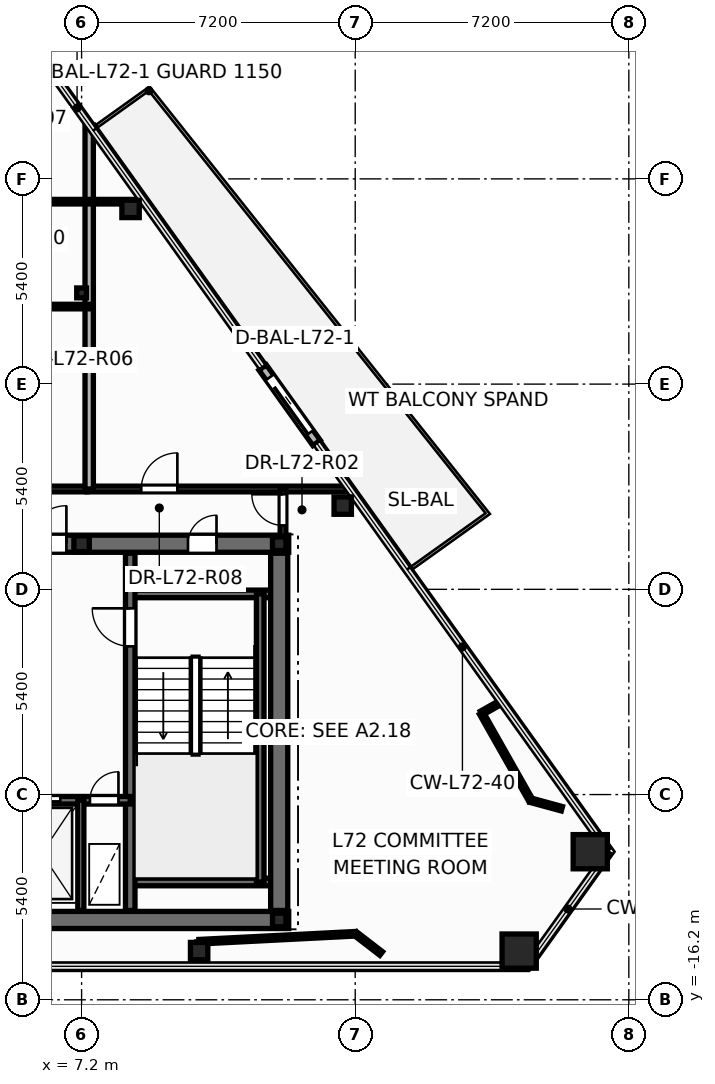
"""IFC4 building model, lengths in metres.
Left out: names, types, materials, properties, quantities, classifications, styles, units other than length and angle.
Written with IfcOpenShell. Run it as: python <this file> out.ifc"""

import sys

from ifc_helpers import new_model, si_unit, direction, frame, frame_2d, origin, origin_2d, place, context, subcontext, project, spatial, rectangle, hollow_rectangle, hollow_circle, i_section, extrude, element, fill, save


model = new_model("IFC4")
c1 = context("Model", 3, precision=1e-05, world=origin(), true_north=direction((0.0, 1.0)))
c2 = subcontext(c1, "Body", "Model", "MODEL_VIEW")
j1 = project(units=[si_unit("LENGTHUNIT", "METRE"), si_unit("PLANEANGLEUNIT", "RADIAN")], contexts=[c1])
p1 = place(None, origin())
s1 = spatial("IfcSite", under=j1, at=p1, CompositionType="ELEMENT")
p2 = place(p1, origin())
s2 = spatial("IfcBuilding", under=s1, at=p2, CompositionType="ELEMENT")
p3 = place(p2, frame((0.0, 0.0, 274.2)))
s3 = spatial("IfcBuildingStorey", under=s2, at=p3, CompositionType="ELEMENT", Elevation=274.2)
for number, where, z_axis, x_axis in (
    (1, (18.714, -14.919, 0.0), (0.0, 0.0, 1.0), (1.0, 0.0, 0.0)),
    (2, (20.585, -12.303, 0.0), (0.0, 0.0, 1.0), (1.0, 0.0, 0.0)),
):
    element("IfcColumn", number, at=place(p3, frame(where, z_axis=z_axis, x_axis=x_axis)), inside=s3, PredefinedType="COLUMN", context=c2, shape_type="SweptSolid", body=[
        extrude(hollow_rectangle(XDim=0.9, YDim=0.9, WallThickness=0.04, at=origin_2d()), origin(), (0.0, 0.0, 1.0), 3.6),
    ])
for number, where, z_axis, x_axis in (
    (3, (10.293, -14.919, 0.0), (0.0, 0.0, 1.0), (1.0, 0.0, 0.0)),
    (4, (14.072, -3.196, 0.0), (0.0, 0.0, 1.0), (1.0, 0.0, 0.0)),
    (5, (8.489, 4.61, 0.0), (0.0, 0.0, 1.0), (1.0, 0.0, 0.0)),
):
    element("IfcColumn", number, at=place(p3, frame(where, z_axis=z_axis, x_axis=x_axis)), inside=s3, PredefinedType="COLUMN", context=c2, shape_type="SweptSolid", body=[
        extrude(hollow_circle(Radius=0.229, WallThickness=0.016, at=origin_2d()), origin(), (0.0, 0.0, 1.0), 3.6),
    ])
for number, where, z_axis, x_axis in (
    (6, (12.4, -14.1, 0.0), (0.0, 0.0, 1.0), (1.0, 0.0, 0.0)),
    (7, (12.4, -4.2, 0.0), (0.0, 0.0, 1.0), (1.0, 0.0, 0.0)),
):
    element("IfcColumn", number, at=place(p3, frame(where, z_axis=z_axis, x_axis=x_axis)), inside=s3, PredefinedType="COLUMN", context=c2, shape_type="SweptSolid", body=[
        extrude(i_section(OverallWidth=0.352, OverallDepth=0.359, WebThickness=0.018, FlangeThickness=0.026, at=origin_2d()), origin(), (0.0, 0.0, 1.0), 3.6),
    ])
p4 = place(p3, frame((7.2, -4.2, 0.0), z_axis=(0.0, 0.0, 1.0), x_axis=(1.0, 0.0, 0.0)))
e8 = element("IfcColumn", 8, at=p4, inside=s3, PredefinedType="PILASTER", context=c2, shape_type="SweptSolid", body=[
    extrude(i_section(OverallWidth=0.405, OverallDepth=0.414, WebThickness=0.022, FlangeThickness=0.032, at=origin_2d()), origin(), (0.0, 0.0, 1.0), 3.6),
])
p5 = place(p3, frame((7.2, 2.4, 0.0), z_axis=(0.0, 0.0, 1.0), x_axis=(1.0, 0.0, 0.0)))
e9 = element("IfcColumn", 9, at=p5, inside=s3, PredefinedType="COLUMN", context=c2, shape_type="SweptSolid", body=[
    extrude(i_section(OverallWidth=0.256, OverallDepth=0.26, WebThickness=0.01, FlangeThickness=0.017, at=origin_2d()), origin(), (0.0, 0.0, 1.0), 3.6),
])
p6 = place(p3, frame((13.383, -1.547, -0.015), z_axis=(0.0, 0.0, 1.0), x_axis=(-0.58167352525, 0.813422344187, 0.0)))
e10 = element("IfcWall", 10, at=p6, inside=s3, PredefinedType="STANDARD", context=c2, shape_type="SweptSolid", body=[
    extrude(rectangle(XDim=2.44, YDim=0.24, at=frame_2d((1.22, 0.0))), origin(), (0.0, 0.0, 1.0), 2.878),
])
p7 = place(p6, frame((0.32, 0.0, 0.015)))
e11 = element("IfcOpeningElement", 11, at=p7, cuts=e10, PredefinedType="OPENING", context=c2, shape_type="SweptSolid", body=[
    extrude(rectangle(XDim=1.806, YDim=2.204, at=frame_2d((0.9, 1.102))), frame((0.0, 0.13, 0.0), z_axis=(0.0, -1.0, 0.0), x_axis=(1.0, 0.0, 0.0)), (0.0, 0.0, 1.0), 0.26),
])
p8 = place(p3, frame((-12.65, -14.1, 0.0), z_axis=(0.0, 0.0, 1.0), x_axis=(1.0, 0.0, 0.0)))
e12 = element("IfcWall", 12, at=p8, inside=s3, PredefinedType="SHEAR", context=c2, shape_type="SweptSolid", body=[
    extrude(rectangle(XDim=25.3, YDim=0.45, at=frame_2d((12.65, 0.0))), origin(), (0.0, 0.0, 1.0), 3.6),
])
p9 = place(p3, frame((-12.65, -4.2, 0.0), z_axis=(0.0, 0.0, 1.0), x_axis=(1.0, 0.0, 0.0)))
e13 = element("IfcWall", 13, at=p9, inside=s3, PredefinedType="SHEAR", context=c2, shape_type="SweptSolid", body=[
    extrude(rectangle(XDim=25.3, YDim=0.45, at=frame_2d((12.65, 0.0))), origin(), (0.0, 0.0, 1.0), 3.6),
])
p10 = place(p9, frame((1.85, 0.0, 0.0)))
e14 = element("IfcOpeningElement", 14, at=p10, cuts=e13, PredefinedType="OPENING", context=c2, shape_type="SweptSolid", body=[
    extrude(rectangle(XDim=0.756, YDim=2.054, at=frame_2d((0.375, 1.027))), frame((0.0, 0.235, 0.0), z_axis=(0.0, -1.0, 0.0), x_axis=(1.0, 0.0, 0.0)), (0.0, 0.0, 1.0), 0.47),
])
p11 = place(p9, frame((22.65, 0.0, 0.0)))
e15 = element("IfcOpeningElement", 15, at=p11, cuts=e13, PredefinedType="OPENING", context=c2, shape_type="SweptSolid", body=[
    extrude(rectangle(XDim=0.756, YDim=2.054, at=frame_2d((0.375, 1.027))), frame((0.0, 0.235, 0.0), z_axis=(0.0, -1.0, 0.0), x_axis=(1.0, 0.0, 0.0)), (0.0, 0.0, 1.0), 0.47),
])
p12 = place(p9, frame((5.85, 0.0, 0.0)))
e16 = element("IfcOpeningElement", 16, at=p12, cuts=e13, PredefinedType="OPENING", context=c2, shape_type="SweptSolid", body=[
    extrude(rectangle(XDim=1.006, YDim=2.104, at=frame_2d((0.5, 1.052))), frame((0.0, 0.235, 0.0), z_axis=(0.0, -1.0, 0.0), x_axis=(1.0, 0.0, 0.0)), (0.0, 0.0, 1.0), 0.47),
])
p13 = place(p9, frame((10.35, 0.0, 0.0)))
e17 = element("IfcOpeningElement", 17, at=p13, cuts=e13, PredefinedType="OPENING", context=c2, shape_type="SweptSolid", body=[
    extrude(rectangle(XDim=1.406, YDim=2.154, at=frame_2d((0.7, 1.077))), frame((0.0, 0.235, 0.0), z_axis=(0.0, -1.0, 0.0), x_axis=(1.0, 0.0, 0.0)), (0.0, 0.0, 1.0), 0.47),
])
p14 = place(p9, frame((18.45, 0.0, 0.0)))
e18 = element("IfcOpeningElement", 18, at=p14, cuts=e13, PredefinedType="OPENING", context=c2, shape_type="SweptSolid", body=[
    extrude(rectangle(XDim=1.006, YDim=2.104, at=frame_2d((0.5, 1.052))), frame((0.0, 0.235, 0.0), z_axis=(0.0, -1.0, 0.0), x_axis=(1.0, 0.0, 0.0)), (0.0, 0.0, 1.0), 0.47),
])
for number, where, z_axis, x_axis in (
    (19, (8.48, -5.52, 0.0), (0.0, 0.0, 1.0), (1.0, 0.0, 0.0)),
    (20, (8.48, -13.1, 0.0), (0.0, 0.0, 1.0), (1.0, 0.0, 0.0)),
):
    element("IfcWall", number, at=place(p3, frame(where, z_axis=z_axis, x_axis=x_axis)), inside=s3, PredefinedType="SOLIDWALL", context=c2, shape_type="SweptSolid", body=[
        extrude(rectangle(XDim=3.87, YDim=0.2, at=frame_2d((1.935, 0.0))), origin(), (0.0, 0.0, 1.0), 3.6),
    ])
p15 = place(p3, frame((11.9, -13.1, 0.0), z_axis=(0.0, 0.0, 1.0), x_axis=(0.0, 1.0, 0.0)))
e21 = element("IfcWall", 21, at=p15, inside=s3, PredefinedType="SOLIDWALL", context=c2, shape_type="SweptSolid", body=[
    extrude(rectangle(XDim=7.58, YDim=0.2, at=frame_2d((3.79, 0.0))), origin(), (0.0, 0.0, 1.0), 3.6),
])
p16 = place(p3, frame((8.48, -13.85, 0.0), z_axis=(0.0, 0.0, 1.0), x_axis=(0.0, 1.0, 0.0)))
e22 = element("IfcWall", 22, at=p16, inside=s3, PredefinedType="SHEAR", context=c2, shape_type="SweptSolid", body=[
    extrude(rectangle(XDim=9.4, YDim=0.25, at=frame_2d((4.7, 0.0))), origin(), (0.0, 0.0, 1.0), 3.6),
])
p17 = place(p16, frame((6.95, 0.0, 0.0)))
e23 = element("IfcOpeningElement", 23, at=p17, cuts=e22, PredefinedType="OPENING", context=c2, shape_type="SweptSolid", body=[
    extrude(rectangle(XDim=1.006, YDim=2.104, at=frame_2d((0.5, 1.052))), frame((0.0, 0.135, 0.0), z_axis=(0.0, -1.0, 0.0), x_axis=(1.0, 0.0, 0.0)), (0.0, 0.0, 1.0), 0.27),
])
p18 = place(p3, frame((5.12, -10.95, 0.0), z_axis=(0.0, 0.0, 1.0), x_axis=(1.0, 0.0, 0.0)))
e24 = element("IfcWall", 24, at=p18, inside=s3, PredefinedType="SOLIDWALL", context=c2, shape_type="SweptSolid", body=[
    extrude(rectangle(XDim=3.36, YDim=0.2, at=frame_2d((1.68, 0.0))), origin(), (0.0, 0.0, 1.0), 3.6),
])
p19 = place(p18, frame((0.42, 0.0, 0.0)))
e25 = element("IfcOpeningElement", 25, at=p19, cuts=e24, PredefinedType="OPENING", context=c2, shape_type="SweptSolid", body=[
    extrude(rectangle(XDim=1.106, YDim=2.104, at=frame_2d((0.55, 1.052))), frame((0.0, 0.11, 0.0), z_axis=(0.0, -1.0, 0.0), x_axis=(1.0, 0.0, 0.0)), (0.0, 0.0, 1.0), 0.22),
])
p20 = place(p18, frame((2.3, 0.0, 0.0)))
e26 = element("IfcOpeningElement", 26, at=p20, cuts=e24, PredefinedType="OPENING", context=c2, shape_type="SweptSolid", body=[
    extrude(rectangle(XDim=0.756, YDim=2.054, at=frame_2d((0.375, 1.027))), frame((0.0, 0.11, 0.0), z_axis=(0.0, -1.0, 0.0), x_axis=(1.0, 0.0, 0.0)), (0.0, 0.0, 1.0), 0.22),
])
p21 = place(p3, frame((7.18, -13.85, 0.0), z_axis=(0.0, 0.0, 1.0), x_axis=(0.0, 1.0, 0.0)))
e27 = element("IfcWall", 27, at=p21, inside=s3, PredefinedType="PARTITIONING", context=c2, shape_type="SweptSolid", body=[
    extrude(rectangle(XDim=2.9, YDim=0.16, at=frame_2d((1.45, 0.0))), origin(), (0.0, 0.0, 1.0), 2.57),
])
p22 = place(p3, frame((12.4, -13.85, 0.0), z_axis=(0.0, 0.0, 1.0), x_axis=(0.0, 1.0, 0.0)))
e28 = element("IfcWall", 28, at=p22, inside=s3, PredefinedType="SHEAR", context=c2, shape_type="SweptSolid", body=[
    extrude(rectangle(XDim=9.4, YDim=0.45, at=frame_2d((4.7, 0.0))), origin(), (0.0, 0.0, 1.0), 3.6),
])
p23 = place(p3, frame((7.34, -2.76, 0.0), z_axis=(0.0, 0.0, 1.0), x_axis=(1.0, 0.0, 0.0)))
e29 = element("IfcWall", 29, at=p23, inside=s3, PredefinedType="PARTITIONING", context=c2, shape_type="SweptSolid", body=[
    extrude(rectangle(XDim=6.911, YDim=0.15, at=frame_2d((3.456, 0.0))), origin(), (0.0, 0.0, 1.0), 2.32),
])
p24 = place(p23, frame((1.43, 0.0, 0.0)))
e30 = element("IfcOpeningElement", 30, at=p24, cuts=e29, PredefinedType="OPENING", context=c2, shape_type="SweptSolid", body=[
    extrude(rectangle(XDim=0.956, YDim=2.104, at=frame_2d((0.475, 1.052))), frame((0.0, 0.085, 0.0), z_axis=(0.0, -1.0, 0.0), x_axis=(1.0, 0.0, 0.0)), (0.0, 0.0, 1.0), 0.17),
])
p25 = place(p3, frame((2.36, -2.76, 0.0), z_axis=(0.0, 0.0, 1.0), x_axis=(1.0, 0.0, 0.0)))
e31 = element("IfcWall", 31, at=p25, inside=s3, PredefinedType="PARTITIONING", context=c2, shape_type="SweptSolid", body=[
    extrude(rectangle(XDim=4.978, YDim=0.15, at=frame_2d((2.489, 0.0))), origin(), (0.0, 0.0, 1.0), 2.32),
])
p26 = place(p25, frame((0.359, 0.0, 0.0)))
e32 = element("IfcOpeningElement", 32, at=p26, cuts=e31, PredefinedType="OPENING", context=c2, shape_type="SweptSolid", body=[
    extrude(rectangle(XDim=0.956, YDim=2.104, at=frame_2d((0.475, 1.052))), frame((0.0, 0.085, 0.0), z_axis=(0.0, -1.0, 0.0), x_axis=(1.0, 0.0, 0.0)), (0.0, 0.0, 1.0), 0.17),
])
p27 = place(p3, frame((7.4, -2.76, 0.0), z_axis=(0.0, 0.0, 1.0), x_axis=(0.0, 1.0, 0.0)))
e33 = element("IfcWall", 33, at=p27, inside=s3, PredefinedType="PARTITIONING", context=c2, shape_type="SweptSolid", body=[
    extrude(rectangle(XDim=9.579, YDim=0.22, at=frame_2d((4.79, 0.0))), origin(), (0.0, 0.0, 1.0), 2.32),
])
p28 = place(p3, frame((4.4, 4.8, 0.0), z_axis=(0.0, 0.0, 1.0), x_axis=(1.0, 0.0, 0.0)))
e34 = element("IfcWall", 34, at=p28, inside=s3, PredefinedType="PARTITIONING", context=c2, shape_type="SweptSolid", body=[
    extrude(rectangle(XDim=4.444, YDim=0.12, at=frame_2d((2.222, 0.0))), origin(), (0.0, 0.0, 1.0), 2.32),
])
p29 = place(p28, frame((0.4, 0.0, 0.0)))
e35 = element("IfcOpeningElement", 35, at=p29, cuts=e34, PredefinedType="OPENING", context=c2, shape_type="SweptSolid", body=[
    extrude(rectangle(XDim=0.926, YDim=2.104, at=frame_2d((0.46, 1.052))), frame((0.0, 0.07, 0.0), z_axis=(0.0, -1.0, 0.0), x_axis=(1.0, 0.0, 0.0)), (0.0, 0.0, 1.0), 0.14),
])
p30 = place(p3, frame((3.68, 2.04, 0.0), z_axis=(0.0, 0.0, 1.0), x_axis=(1.0, 0.0, 0.0)))
e36 = element("IfcWall", 36, at=p30, inside=s3, PredefinedType="PARTITIONING", context=c2, shape_type="SweptSolid", body=[
    extrude(rectangle(XDim=3.72, YDim=0.12, at=frame_2d((1.86, 0.0))), origin(), (0.0, 0.0, 1.0), 2.32),
])
p31 = place(p30, frame((0.435, 0.0, 0.0)))
e37 = element("IfcOpeningElement", 37, at=p31, cuts=e36, PredefinedType="OPENING", context=c2, shape_type="SweptSolid", body=[
    extrude(rectangle(XDim=0.926, YDim=2.104, at=frame_2d((0.46, 1.052))), frame((0.0, 0.07, 0.0), z_axis=(0.0, -1.0, 0.0), x_axis=(1.0, 0.0, 0.0)), (0.0, 0.0, 1.0), 0.14),
])
p32 = place(p3, frame((10.29, -14.672, 0.0), z_axis=(0.0, 0.0, 1.0), x_axis=(0.998709464059, 0.050787856814, 0.0)))
e38 = element("IfcWall", 38, at=p32, inside=s3, PredefinedType="PARTITIONING", context=c2, shape_type="SweptSolid", body=[
    extrude(rectangle(XDim=4.125, YDim=0.12, at=frame_2d((2.062, 0.0))), origin(), (0.0, 0.0, 1.0), 2.32),
])
p33 = place(p3, frame((19.019, -10.95, 0.0), z_axis=(0.0, 0.0, 1.0), x_axis=(-0.492860512567, 0.870108335297, 0.0)))
e39 = element("IfcWall", 39, at=p33, inside=s3, PredefinedType="PARTITIONING", context=c2, shape_type="SweptSolid", body=[
    extrude(rectangle(XDim=2.633, YDim=0.12, at=frame_2d((1.317, 0.0))), origin(), (0.0, 0.0, 1.0), 2.32),
])
p34 = place(p3, frame((12.5, -4.24, 0.0), z_axis=(0.0, 0.0, 1.0), x_axis=(0.0, 1.0, 0.0)))
e40 = element("IfcWall", 40, at=p34, inside=s3, PredefinedType="PARTITIONING", context=c2, shape_type="SweptSolid", body=[
    extrude(rectangle(XDim=1.48, YDim=0.15, at=frame_2d((0.74, 0.0))), origin(), (0.0, 0.0, 1.0), 2.32),
])
p35 = place(p34, frame((0.522, 0.0, 0.0)))
e41 = element("IfcOpeningElement", 41, at=p35, cuts=e40, PredefinedType="OPENING", context=c2, shape_type="SweptSolid", body=[
    extrude(rectangle(XDim=0.826, YDim=2.104, at=frame_2d((0.41, 1.052))), frame((0.0, 0.085, 0.0), z_axis=(0.0, -1.0, 0.0), x_axis=(1.0, 0.0, 0.0)), (0.0, 0.0, 1.0), 0.17),
])
p36 = place(p3, frame((14.409, -14.463, 0.0), z_axis=(0.0, 0.0, 1.0), x_axis=(0.792229581797, -0.610223147484, 0.0)))
e42 = element("IfcWall", 42, at=p36, inside=s3, PredefinedType="PARTITIONING", context=c2, shape_type="SweptSolid", body=[
    extrude(rectangle(XDim=0.852, YDim=0.12, at=frame_2d((0.426, 0.0))), origin(), (0.0, 0.0, 1.0), 2.32),
])
p37 = place(p3, frame((19.838, -11.174, 0.0), z_axis=(0.0, 0.0, 1.0), x_axis=(-0.964783720957, 0.263044429283, 0.0)))
e43 = element("IfcWall", 43, at=p37, inside=s3, PredefinedType="PARTITIONING", context=c2, shape_type="SweptSolid", body=[
    extrude(rectangle(XDim=0.849, YDim=0.12, at=frame_2d((0.425, 0.0))), origin(), (0.0, 0.0, 1.0), 2.32),
])
p38 = place(p3, frame((10.323, -15.309, 0.0), z_axis=(0.0, 0.0, 1.0), x_axis=(-0.050930748048, 0.998702187293, 0.0)))
e44 = element("IfcWall", 44, at=p38, inside=s3, PredefinedType="PARTITIONING", context=c2, shape_type="SweptSolid", body=[
    extrude(rectangle(XDim=0.637, YDim=0.12, at=frame_2d((0.319, 0.0))), origin(), (0.0, 0.0, 1.0), 2.32),
])
p39 = place(p3, frame((17.721, -8.659, 0.0), z_axis=(0.0, 0.0, 1.0), x_axis=(0.870230638559, 0.492644532816, 0.0)))
e45 = element("IfcWall", 45, at=p39, inside=s3, PredefinedType="PARTITIONING", context=c2, shape_type="SweptSolid", body=[
    extrude(rectangle(XDim=0.603, YDim=0.12, at=frame_2d((0.301, 0.0))), origin(), (0.0, 0.0, 1.0), 2.863),
])
p40 = place(p7, origin())
e46 = element("IfcDoor", 46, at=p40, inside=s3, OperationType="SLIDING_TO_LEFT", PredefinedType="DOOR", context=c2, shape_type="SweptSolid", body=[
    extrude(rectangle(XDim=1.8, YDim=2.2, at=frame_2d((0.9, 1.1))), frame((0.0, 0.025, 0.0), z_axis=(0.0, -1.0, 0.0), x_axis=(1.0, 0.0, 0.0)), (0.0, 0.0, 1.0), 0.05),
])
fill(e11, e46)
p41 = place(p17, origin())
e47 = element("IfcDoor", 47, at=p41, inside=s3, OperationType="SINGLE_SWING_RIGHT", PredefinedType="DOOR", context=c2, shape_type="SweptSolid", body=[
    extrude(rectangle(XDim=1.0, YDim=2.1, at=frame_2d((0.5, 1.05))), frame((0.0, 0.025, 0.0), z_axis=(0.0, -1.0, 0.0), x_axis=(1.0, 0.0, 0.0)), (0.0, 0.0, 1.0), 0.05),
])
fill(e23, e47)
p42 = place(p19, origin())
e48 = element("IfcDoor", 48, at=p42, inside=s3, OperationType="DOUBLE_DOOR_SLIDING", PredefinedType="DOOR", context=c2, shape_type="SweptSolid", body=[
    extrude(rectangle(XDim=1.1, YDim=2.1, at=frame_2d((0.55, 1.05))), frame((0.0, 0.025, 0.0), z_axis=(0.0, -1.0, 0.0), x_axis=(1.0, 0.0, 0.0)), (0.0, 0.0, 1.0), 0.05),
])
fill(e25, e48)
p43 = place(p20, origin())
e49 = element("IfcDoor", 49, at=p43, inside=s3, OperationType="SINGLE_SWING_RIGHT", PredefinedType="DOOR", context=c2, shape_type="SweptSolid", body=[
    extrude(rectangle(XDim=0.75, YDim=2.05, at=frame_2d((0.375, 1.025))), frame((0.0, 0.025, 0.0), z_axis=(0.0, -1.0, 0.0), x_axis=(1.0, 0.0, 0.0)), (0.0, 0.0, 1.0), 0.05),
])
fill(e26, e49)
p44 = place(p11, origin())
e50 = element("IfcDoor", 50, at=p44, inside=s3, OperationType="SINGLE_SWING_RIGHT", PredefinedType="DOOR", context=c2, shape_type="SweptSolid", body=[
    extrude(rectangle(XDim=0.75, YDim=2.05, at=frame_2d((0.375, 1.025))), frame((0.0, 0.025, 0.0), z_axis=(0.0, -1.0, 0.0), x_axis=(1.0, 0.0, 0.0)), (0.0, 0.0, 1.0), 0.05),
])
fill(e15, e50)
p45 = place(p14, origin())
e51 = element("IfcDoor", 51, at=p45, inside=s3, OperationType="SINGLE_SWING_RIGHT", PredefinedType="DOOR", context=c2, shape_type="SweptSolid", body=[
    extrude(rectangle(XDim=1.0, YDim=2.1, at=frame_2d((0.5, 1.05))), frame((0.0, 0.025, 0.0), z_axis=(0.0, -1.0, 0.0), x_axis=(1.0, 0.0, 0.0)), (0.0, 0.0, 1.0), 0.05),
])
fill(e18, e51)
p46 = place(p35, origin())
e52 = element("IfcDoor", 52, at=p46, inside=s3, OperationType="SINGLE_SWING_RIGHT", PredefinedType="DOOR", context=c2, shape_type="SweptSolid", body=[
    extrude(rectangle(XDim=0.82, YDim=2.1, at=frame_2d((0.41, 1.05))), frame((0.0, 0.025, 0.0), z_axis=(0.0, -1.0, 0.0), x_axis=(1.0, 0.0, 0.0)), (0.0, 0.0, 1.0), 0.05),
])
fill(e41, e52)
p47 = place(p24, origin())
e53 = element("IfcDoor", 53, at=p47, inside=s3, OperationType="SINGLE_SWING_RIGHT", PredefinedType="DOOR", context=c2, shape_type="SweptSolid", body=[
    extrude(rectangle(XDim=0.95, YDim=2.1, at=frame_2d((0.475, 1.05))), frame((0.0, 0.025, 0.0), z_axis=(0.0, -1.0, 0.0), x_axis=(1.0, 0.0, 0.0)), (0.0, 0.0, 1.0), 0.05),
])
fill(e30, e53)
save(model, sys.argv[1])
